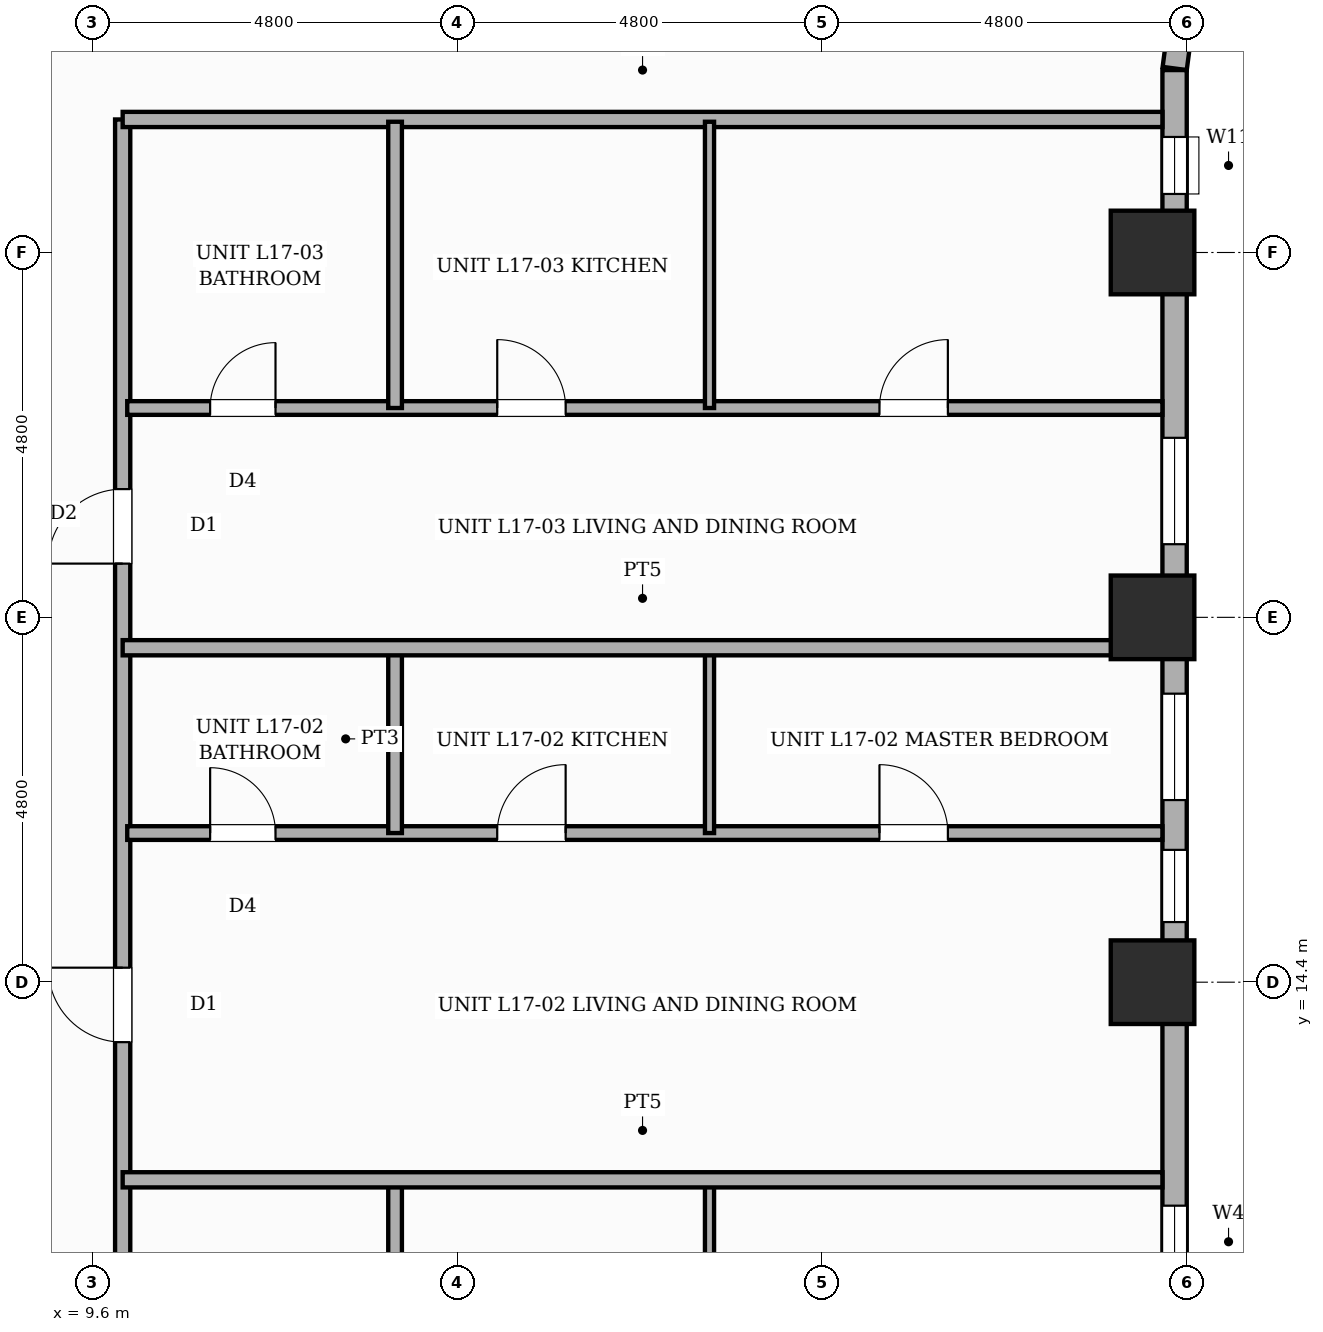
"""IFC4 building model, lengths in metres.
Left out: names, types, materials, properties, quantities, classifications, styles, units other than length and angle.
Written with IfcOpenShell. Run it as: python <this file> out.ifc"""

import sys

from ifc_helpers import new_model, si_unit, direction, frame, frame_2d, origin, origin_2d, place, context, subcontext, project, spatial, rectangle, extrude, element, fill, save


model = new_model("IFC4")
c1 = context("Model", 3, precision=1e-05, world=origin(), true_north=direction((0.0, 1.0)))
c2 = subcontext(c1, "Body", "Model", "MODEL_VIEW")
j1 = project(units=[si_unit("LENGTHUNIT", "METRE"), si_unit("PLANEANGLEUNIT", "RADIAN")], contexts=[c1])
p1 = place(None, origin())
s1 = spatial("IfcSite", under=j1, at=p1, CompositionType="ELEMENT")
p2 = place(p1, origin())
s2 = spatial("IfcBuilding", under=s1, at=p2, CompositionType="ELEMENT")
p3 = place(p2, frame((0.0, 0.0, 68.2)))
s3 = spatial("IfcBuildingStorey", under=s2, at=p3, CompositionType="ELEMENT", Elevation=68.2)
for number, where, z_axis, x_axis in (
    (1, (23.55, 14.4, 0.0), (0.0, 0.0, 1.0), (1.0, 0.0, 0.0)),
    (2, (23.55, 19.2, 0.0), (0.0, 0.0, 1.0), (1.0, 0.0, 0.0)),
    (3, (23.55, 24.0, 0.0), (0.0, 0.0, 1.0), (1.0, 0.0, 0.0)),
):
    element("IfcColumn", number, at=place(p3, frame(where, z_axis=z_axis, x_axis=x_axis)), inside=s3, PredefinedType="COLUMN", context=c2, shape_type="SweptSolid", body=[
        extrude(rectangle(XDim=1.1, YDim=1.1, at=origin_2d()), origin(), (0.0, 0.0, 1.0), 3.6),
    ])
p4 = place(p3, frame((23.923, 27.042, 0.0), z_axis=(0.0, 0.0, 1.0), x_axis=(-0.130555323746, -0.9914410257, 0.0)))
e4 = element("IfcWall", 4, at=p4, inside=s3, PredefinedType="STANDARD", context=c2, shape_type="SweptSolid", body=[
    extrude(rectangle(XDim=0.626, YDim=0.32, at=frame_2d((0.313, 0.0))), origin(), (0.0, 0.0, 1.0), 2.53),
])
p5 = place(p3, frame((23.84, 26.4, 0.0), z_axis=(0.0, 0.0, 1.0), x_axis=(0.0, -1.0, 0.0)))
e5 = element("IfcWall", 5, at=p5, inside=s3, PredefinedType="STANDARD", context=c2, shape_type="SweptSolid", body=[
    extrude(rectangle(XDim=19.2, YDim=0.32, at=frame_2d((9.6, 0.0))), origin(), (0.0, 0.0, 1.0), 2.53),
])
p6 = place(p5, frame((14.94, 0.0, 0.45)))
e6 = element("IfcOpeningElement", 6, at=p6, cuts=e5, PredefinedType="OPENING", context=c2, shape_type="SweptSolid", body=[
    extrude(rectangle(XDim=0.95, YDim=1.8, at=frame_2d((0.475, 0.9))), frame((0.0, 0.17, 0.0), z_axis=(0.0, -1.0, 0.0), x_axis=(1.0, 0.0, 0.0)), (0.0, 0.0, 1.0), 0.34),
])
p7 = place(p5, frame((8.204, 0.0, 0.65)))
e7 = element("IfcOpeningElement", 7, at=p7, cuts=e5, PredefinedType="OPENING", context=c2, shape_type="SweptSolid", body=[
    extrude(rectangle(XDim=1.4, YDim=1.1, at=frame_2d((0.7, 0.55))), frame((0.0, 0.17, 0.0), z_axis=(0.0, -1.0, 0.0), x_axis=(1.0, 0.0, 0.0)), (0.0, 0.0, 1.0), 0.34),
])
p8 = place(p5, frame((0.88, 0.0, 0.45)))
e8 = element("IfcOpeningElement", 8, at=p8, cuts=e5, PredefinedType="OPENING", context=c2, shape_type="SweptSolid", body=[
    extrude(rectangle(XDim=0.75, YDim=1.8, at=frame_2d((0.375, 0.9))), frame((0.0, 0.17, 0.0), z_axis=(0.0, -1.0, 0.0), x_axis=(1.0, 0.0, 0.0)), (0.0, 0.0, 1.0), 0.34),
])
p9 = place(p5, frame((10.259, 0.0, 0.45)))
e9 = element("IfcOpeningElement", 9, at=p9, cuts=e5, PredefinedType="OPENING", context=c2, shape_type="SweptSolid", body=[
    extrude(rectangle(XDim=0.95, YDim=1.8, at=frame_2d((0.475, 0.9))), frame((0.0, 0.17, 0.0), z_axis=(0.0, -1.0, 0.0), x_axis=(1.0, 0.0, 0.0)), (0.0, 0.0, 1.0), 0.34),
])
p10 = place(p5, frame((4.838, 0.0, 0.65)))
e10 = element("IfcOpeningElement", 10, at=p10, cuts=e5, PredefinedType="OPENING", context=c2, shape_type="SweptSolid", body=[
    extrude(rectangle(XDim=1.4, YDim=1.1, at=frame_2d((0.7, 0.55))), frame((0.0, 0.17, 0.0), z_axis=(0.0, -1.0, 0.0), x_axis=(1.0, 0.0, 0.0)), (0.0, 0.0, 1.0), 0.34),
])
p11 = place(p3, frame((10.0, 5.12, 0.0), z_axis=(0.0, 0.0, 1.0), x_axis=(0.0, 1.0, 0.0)))
e11 = element("IfcWall", 11, at=p11, inside=s3, PredefinedType="PARTITIONING", context=c2, shape_type="SweptSolid", body=[
    extrude(rectangle(XDim=20.63, YDim=0.2, at=frame_2d((10.315, 0.0))), origin(), (0.0, 0.0, 1.0), 3.35),
])
p12 = place(p11, frame((0.998, 0.0, 0.0)))
e12 = element("IfcOpeningElement", 12, at=p12, cuts=e11, PredefinedType="OPENING", context=c2, shape_type="SweptSolid", body=[
    extrude(rectangle(XDim=0.98, YDim=2.18, at=frame_2d((0.49, 1.09))), frame((0.0, 0.11, 0.0), z_axis=(0.0, -1.0, 0.0), x_axis=(1.0, 0.0, 0.0)), (0.0, 0.0, 1.0), 0.22),
])
p13 = place(p11, frame((8.491, 0.0, 0.0)))
e13 = element("IfcOpeningElement", 13, at=p13, cuts=e11, PredefinedType="OPENING", context=c2, shape_type="SweptSolid", body=[
    extrude(rectangle(XDim=0.98, YDim=2.18, at=frame_2d((0.49, 1.09))), frame((0.0, 0.11, 0.0), z_axis=(0.0, -1.0, 0.0), x_axis=(1.0, 0.0, 0.0)), (0.0, 0.0, 1.0), 0.22),
])
p14 = place(p11, frame((14.787, 0.0, 0.0)))
e14 = element("IfcOpeningElement", 14, at=p14, cuts=e11, PredefinedType="OPENING", context=c2, shape_type="SweptSolid", body=[
    extrude(rectangle(XDim=0.98, YDim=2.18, at=frame_2d((0.49, 1.09))), frame((0.0, 0.11, 0.0), z_axis=(0.0, -1.0, 0.0), x_axis=(1.0, 0.0, 0.0)), (0.0, 0.0, 1.0), 0.22),
])
p15 = place(p3, frame((10.0, 25.75, 0.0), z_axis=(0.0, 0.0, 1.0), x_axis=(1.0, 0.0, 0.0)))
e15 = element("IfcWall", 15, at=p15, inside=s3, PredefinedType="PARTITIONING", context=c2, shape_type="SweptSolid", body=[
    extrude(rectangle(XDim=13.68, YDim=0.2, at=frame_2d((6.84, 0.0))), origin(), (0.0, 0.0, 1.0), 3.35),
])
p16 = place(p3, frame((13.584, 7.536, 0.0), z_axis=(0.0, 0.0, 1.0), x_axis=(0.0, 1.0, 0.0)))
e16 = element("IfcWall", 16, at=p16, inside=s3, PredefinedType="PLUMBINGWALL", context=c2, shape_type="SweptSolid", body=[
    extrude(rectangle(XDim=4.304, YDim=0.18, at=frame_2d((2.152, 0.0))), origin(), (0.0, 0.0, 1.0), 3.35),
])
p17 = place(p3, frame((17.721, 7.536, 0.0), z_axis=(0.0, 0.0, 1.0), x_axis=(0.0, 1.0, 0.0)))
e17 = element("IfcWall", 17, at=p17, inside=s3, PredefinedType="PARTITIONING", context=c2, shape_type="SweptSolid", body=[
    extrude(rectangle(XDim=4.304, YDim=0.12, at=frame_2d((2.152, 0.0))), origin(), (0.0, 0.0, 1.0), 3.35),
])
p18 = place(p3, frame((10.0, 11.8, 0.0), z_axis=(0.0, 0.0, 1.0), x_axis=(1.0, 0.0, 0.0)))
e18 = element("IfcWall", 18, at=p18, inside=s3, PredefinedType="SOLIDWALL", context=c2, shape_type="SweptSolid", body=[
    extrude(rectangle(XDim=13.68, YDim=0.2, at=frame_2d((6.84, 0.0))), origin(), (0.0, 0.0, 1.0), 3.35),
])
p19 = place(p3, frame((10.06, 16.362, 0.0), z_axis=(0.0, 0.0, 1.0), x_axis=(1.0, 0.0, 0.0)))
e19 = element("IfcWall", 19, at=p19, inside=s3, PredefinedType="PLUMBINGWALL", context=c2, shape_type="SweptSolid", body=[
    extrude(rectangle(XDim=13.62, YDim=0.18, at=frame_2d((6.81, 0.0))), origin(), (0.0, 0.0, 1.0), 3.35),
])
p20 = place(p19, frame((1.091, 0.0, 0.0)))
e20 = element("IfcOpeningElement", 20, at=p20, cuts=e19, PredefinedType="OPENING", context=c2, shape_type="SweptSolid", body=[
    extrude(rectangle(XDim=0.86, YDim=2.1, at=frame_2d((0.43, 1.05))), frame((0.0, 0.1, 0.0), z_axis=(0.0, -1.0, 0.0), x_axis=(1.0, 0.0, 0.0)), (0.0, 0.0, 1.0), 0.2),
])
p21 = place(p19, frame((4.868, 0.0, 0.0)))
e21 = element("IfcOpeningElement", 21, at=p21, cuts=e19, PredefinedType="OPENING", context=c2, shape_type="SweptSolid", body=[
    extrude(rectangle(XDim=0.9, YDim=2.15, at=frame_2d((0.45, 1.075))), frame((0.0, 0.1, 0.0), z_axis=(0.0, -1.0, 0.0), x_axis=(1.0, 0.0, 0.0)), (0.0, 0.0, 1.0), 0.2),
])
p22 = place(p19, frame((9.897, 0.0, 0.0)))
e22 = element("IfcOpeningElement", 22, at=p22, cuts=e19, PredefinedType="OPENING", context=c2, shape_type="SweptSolid", body=[
    extrude(rectangle(XDim=0.9, YDim=2.15, at=frame_2d((0.45, 1.075))), frame((0.0, 0.1, 0.0), z_axis=(0.0, -1.0, 0.0), x_axis=(1.0, 0.0, 0.0)), (0.0, 0.0, 1.0), 0.2),
])
p23 = place(p3, frame((13.584, 16.362, 0.0), z_axis=(0.0, 0.0, 1.0), x_axis=(0.0, 1.0, 0.0)))
e23 = element("IfcWall", 23, at=p23, inside=s3, PredefinedType="PLUMBINGWALL", context=c2, shape_type="SweptSolid", body=[
    extrude(rectangle(XDim=2.478, YDim=0.18, at=frame_2d((1.239, 0.0))), origin(), (0.0, 0.0, 1.0), 3.35),
])
p24 = place(p3, frame((17.721, 16.362, 0.0), z_axis=(0.0, 0.0, 1.0), x_axis=(0.0, 1.0, 0.0)))
e24 = element("IfcWall", 24, at=p24, inside=s3, PredefinedType="PARTITIONING", context=c2, shape_type="SweptSolid", body=[
    extrude(rectangle(XDim=2.478, YDim=0.12, at=frame_2d((1.239, 0.0))), origin(), (0.0, 0.0, 1.0), 3.35),
])
p25 = place(p3, frame((10.0, 18.8, 0.0), z_axis=(0.0, 0.0, 1.0), x_axis=(1.0, 0.0, 0.0)))
e25 = element("IfcWall", 25, at=p25, inside=s3, PredefinedType="SOLIDWALL", context=c2, shape_type="SweptSolid", body=[
    extrude(rectangle(XDim=13.68, YDim=0.2, at=frame_2d((6.84, 0.0))), origin(), (0.0, 0.0, 1.0), 3.35),
])
p26 = place(p3, frame((10.06, 21.954, 0.0), z_axis=(0.0, 0.0, 1.0), x_axis=(1.0, 0.0, 0.0)))
e26 = element("IfcWall", 26, at=p26, inside=s3, PredefinedType="PLUMBINGWALL", context=c2, shape_type="SweptSolid", body=[
    extrude(rectangle(XDim=13.62, YDim=0.18, at=frame_2d((6.81, 0.0))), origin(), (0.0, 0.0, 1.0), 3.35),
])
p27 = place(p26, frame((1.091, 0.0, 0.0)))
e27 = element("IfcOpeningElement", 27, at=p27, cuts=e26, PredefinedType="OPENING", context=c2, shape_type="SweptSolid", body=[
    extrude(rectangle(XDim=0.86, YDim=2.1, at=frame_2d((0.43, 1.05))), frame((0.0, 0.1, 0.0), z_axis=(0.0, -1.0, 0.0), x_axis=(1.0, 0.0, 0.0)), (0.0, 0.0, 1.0), 0.2),
])
p28 = place(p26, frame((4.868, 0.0, 0.0)))
e28 = element("IfcOpeningElement", 28, at=p28, cuts=e26, PredefinedType="OPENING", context=c2, shape_type="SweptSolid", body=[
    extrude(rectangle(XDim=0.9, YDim=2.15, at=frame_2d((0.45, 1.075))), frame((0.0, 0.1, 0.0), z_axis=(0.0, -1.0, 0.0), x_axis=(1.0, 0.0, 0.0)), (0.0, 0.0, 1.0), 0.2),
])
p29 = place(p26, frame((9.897, 0.0, 0.0)))
e29 = element("IfcOpeningElement", 29, at=p29, cuts=e26, PredefinedType="OPENING", context=c2, shape_type="SweptSolid", body=[
    extrude(rectangle(XDim=0.9, YDim=2.15, at=frame_2d((0.45, 1.075))), frame((0.0, 0.1, 0.0), z_axis=(0.0, -1.0, 0.0), x_axis=(1.0, 0.0, 0.0)), (0.0, 0.0, 1.0), 0.2),
])
p30 = place(p3, frame((13.584, 21.954, 0.0), z_axis=(0.0, 0.0, 1.0), x_axis=(0.0, 1.0, 0.0)))
e30 = element("IfcWall", 30, at=p30, inside=s3, PredefinedType="PLUMBINGWALL", context=c2, shape_type="SweptSolid", body=[
    extrude(rectangle(XDim=3.766, YDim=0.18, at=frame_2d((1.883, 0.0))), origin(), (0.0, 0.0, 1.0), 3.35),
])
p31 = place(p3, frame((17.721, 21.954, 0.0), z_axis=(0.0, 0.0, 1.0), x_axis=(0.0, 1.0, 0.0)))
e31 = element("IfcWall", 31, at=p31, inside=s3, PredefinedType="PARTITIONING", context=c2, shape_type="SweptSolid", body=[
    extrude(rectangle(XDim=3.766, YDim=0.12, at=frame_2d((1.883, 0.0))), origin(), (0.0, 0.0, 1.0), 3.35),
])
p32 = place(p6, origin())
e32 = element("IfcWindow", 32, at=p32, inside=s3, PartitioningType="SINGLE_PANEL", PredefinedType="WINDOW", context=c2, shape_type="SweptSolid", body=[
    extrude(rectangle(XDim=0.95, YDim=1.8, at=frame_2d((0.475, 0.9))), frame((0.0, 0.03, 0.0), z_axis=(0.0, -1.0, 0.0), x_axis=(1.0, 0.0, 0.0)), (0.0, 0.0, 1.0), 0.06),
])
fill(e6, e32)
p33 = place(p7, origin())
e33 = element("IfcWindow", 33, at=p33, inside=s3, PartitioningType="SINGLE_PANEL", PredefinedType="WINDOW", context=c2, shape_type="SweptSolid", body=[
    extrude(rectangle(XDim=1.4, YDim=1.1, at=frame_2d((0.7, 0.55))), frame((0.0, 0.03, 0.0), z_axis=(0.0, -1.0, 0.0), x_axis=(1.0, 0.0, 0.0)), (0.0, 0.0, 1.0), 0.06),
])
fill(e7, e33)
p34 = place(p8, origin())
e34 = element("IfcWindow", 34, at=p34, inside=s3, PartitioningType="SINGLE_PANEL", PredefinedType="WINDOW", context=c2, shape_type="SweptSolid", body=[
    extrude(rectangle(XDim=0.75, YDim=1.8, at=frame_2d((0.375, 0.9))), frame((0.0, 0.03, 0.0), z_axis=(0.0, -1.0, 0.0), x_axis=(1.0, 0.0, 0.0)), (0.0, 0.0, 1.0), 0.06),
])
fill(e8, e34)
p35 = place(p9, origin())
e35 = element("IfcWindow", 35, at=p35, inside=s3, PartitioningType="SINGLE_PANEL", PredefinedType="WINDOW", context=c2, shape_type="SweptSolid", body=[
    extrude(rectangle(XDim=0.95, YDim=1.8, at=frame_2d((0.475, 0.9))), frame((0.0, 0.03, 0.0), z_axis=(0.0, -1.0, 0.0), x_axis=(1.0, 0.0, 0.0)), (0.0, 0.0, 1.0), 0.06),
])
fill(e9, e35)
p36 = place(p10, origin())
e36 = element("IfcWindow", 36, at=p36, inside=s3, PartitioningType="SINGLE_PANEL", PredefinedType="WINDOW", context=c2, shape_type="SweptSolid", body=[
    extrude(rectangle(XDim=1.4, YDim=1.1, at=frame_2d((0.7, 0.55))), frame((0.0, 0.03, 0.0), z_axis=(0.0, -1.0, 0.0), x_axis=(1.0, 0.0, 0.0)), (0.0, 0.0, 1.0), 0.06),
])
fill(e10, e36)
p37 = place(p13, origin())
e37 = element("IfcDoor", 37, at=p37, inside=s3, OperationType="SINGLE_SWING_RIGHT", PredefinedType="DOOR", context=c2, shape_type="SweptSolid", body=[
    extrude(rectangle(XDim=0.98, YDim=2.18, at=frame_2d((0.49, 1.09))), frame((0.0, 0.025, 0.0), z_axis=(0.0, -1.0, 0.0), x_axis=(1.0, 0.0, 0.0)), (0.0, 0.0, 1.0), 0.05),
])
fill(e13, e37)
p38 = place(p20, origin())
e38 = element("IfcDoor", 38, at=p38, inside=s3, OperationType="SINGLE_SWING_LEFT", PredefinedType="DOOR", context=c2, shape_type="SweptSolid", body=[
    extrude(rectangle(XDim=0.86, YDim=2.1, at=frame_2d((0.43, 1.05))), frame((0.0, 0.025, 0.0), z_axis=(0.0, -1.0, 0.0), x_axis=(1.0, 0.0, 0.0)), (0.0, 0.0, 1.0), 0.05),
])
fill(e20, e38)
p39 = place(p21, origin())
e39 = element("IfcDoor", 39, at=p39, inside=s3, OperationType="SINGLE_SWING_RIGHT", PredefinedType="DOOR", context=c2, shape_type="SweptSolid", body=[
    extrude(rectangle(XDim=0.9, YDim=2.15, at=frame_2d((0.45, 1.075))), frame((0.0, 0.025, 0.0), z_axis=(0.0, -1.0, 0.0), x_axis=(1.0, 0.0, 0.0)), (0.0, 0.0, 1.0), 0.05),
])
fill(e21, e39)
p40 = place(p22, origin())
e40 = element("IfcDoor", 40, at=p40, inside=s3, OperationType="SINGLE_SWING_LEFT", PredefinedType="DOOR", context=c2, shape_type="SweptSolid", body=[
    extrude(rectangle(XDim=0.9, YDim=2.15, at=frame_2d((0.45, 1.075))), frame((0.0, 0.025, 0.0), z_axis=(0.0, -1.0, 0.0), x_axis=(1.0, 0.0, 0.0)), (0.0, 0.0, 1.0), 0.05),
])
fill(e22, e40)
p41 = place(p14, origin())
e41 = element("IfcDoor", 41, at=p41, inside=s3, OperationType="SINGLE_SWING_LEFT", PredefinedType="DOOR", context=c2, shape_type="SweptSolid", body=[
    extrude(rectangle(XDim=0.98, YDim=2.18, at=frame_2d((0.49, 1.09))), frame((0.0, 0.025, 0.0), z_axis=(0.0, -1.0, 0.0), x_axis=(1.0, 0.0, 0.0)), (0.0, 0.0, 1.0), 0.05),
])
fill(e14, e41)
p42 = place(p27, origin())
e42 = element("IfcDoor", 42, at=p42, inside=s3, OperationType="SINGLE_SWING_RIGHT", PredefinedType="DOOR", context=c2, shape_type="SweptSolid", body=[
    extrude(rectangle(XDim=0.86, YDim=2.1, at=frame_2d((0.43, 1.05))), frame((0.0, 0.025, 0.0), z_axis=(0.0, -1.0, 0.0), x_axis=(1.0, 0.0, 0.0)), (0.0, 0.0, 1.0), 0.05),
])
fill(e27, e42)
p43 = place(p28, origin())
e43 = element("IfcDoor", 43, at=p43, inside=s3, OperationType="SINGLE_SWING_LEFT", PredefinedType="DOOR", context=c2, shape_type="SweptSolid", body=[
    extrude(rectangle(XDim=0.9, YDim=2.15, at=frame_2d((0.45, 1.075))), frame((0.0, 0.025, 0.0), z_axis=(0.0, -1.0, 0.0), x_axis=(1.0, 0.0, 0.0)), (0.0, 0.0, 1.0), 0.05),
])
fill(e28, e43)
p44 = place(p29, origin())
e44 = element("IfcDoor", 44, at=p44, inside=s3, OperationType="SINGLE_SWING_RIGHT", PredefinedType="DOOR", context=c2, shape_type="SweptSolid", body=[
    extrude(rectangle(XDim=0.9, YDim=2.15, at=frame_2d((0.45, 1.075))), frame((0.0, 0.025, 0.0), z_axis=(0.0, -1.0, 0.0), x_axis=(1.0, 0.0, 0.0)), (0.0, 0.0, 1.0), 0.05),
])
fill(e29, e44)
save(model, sys.argv[1])
